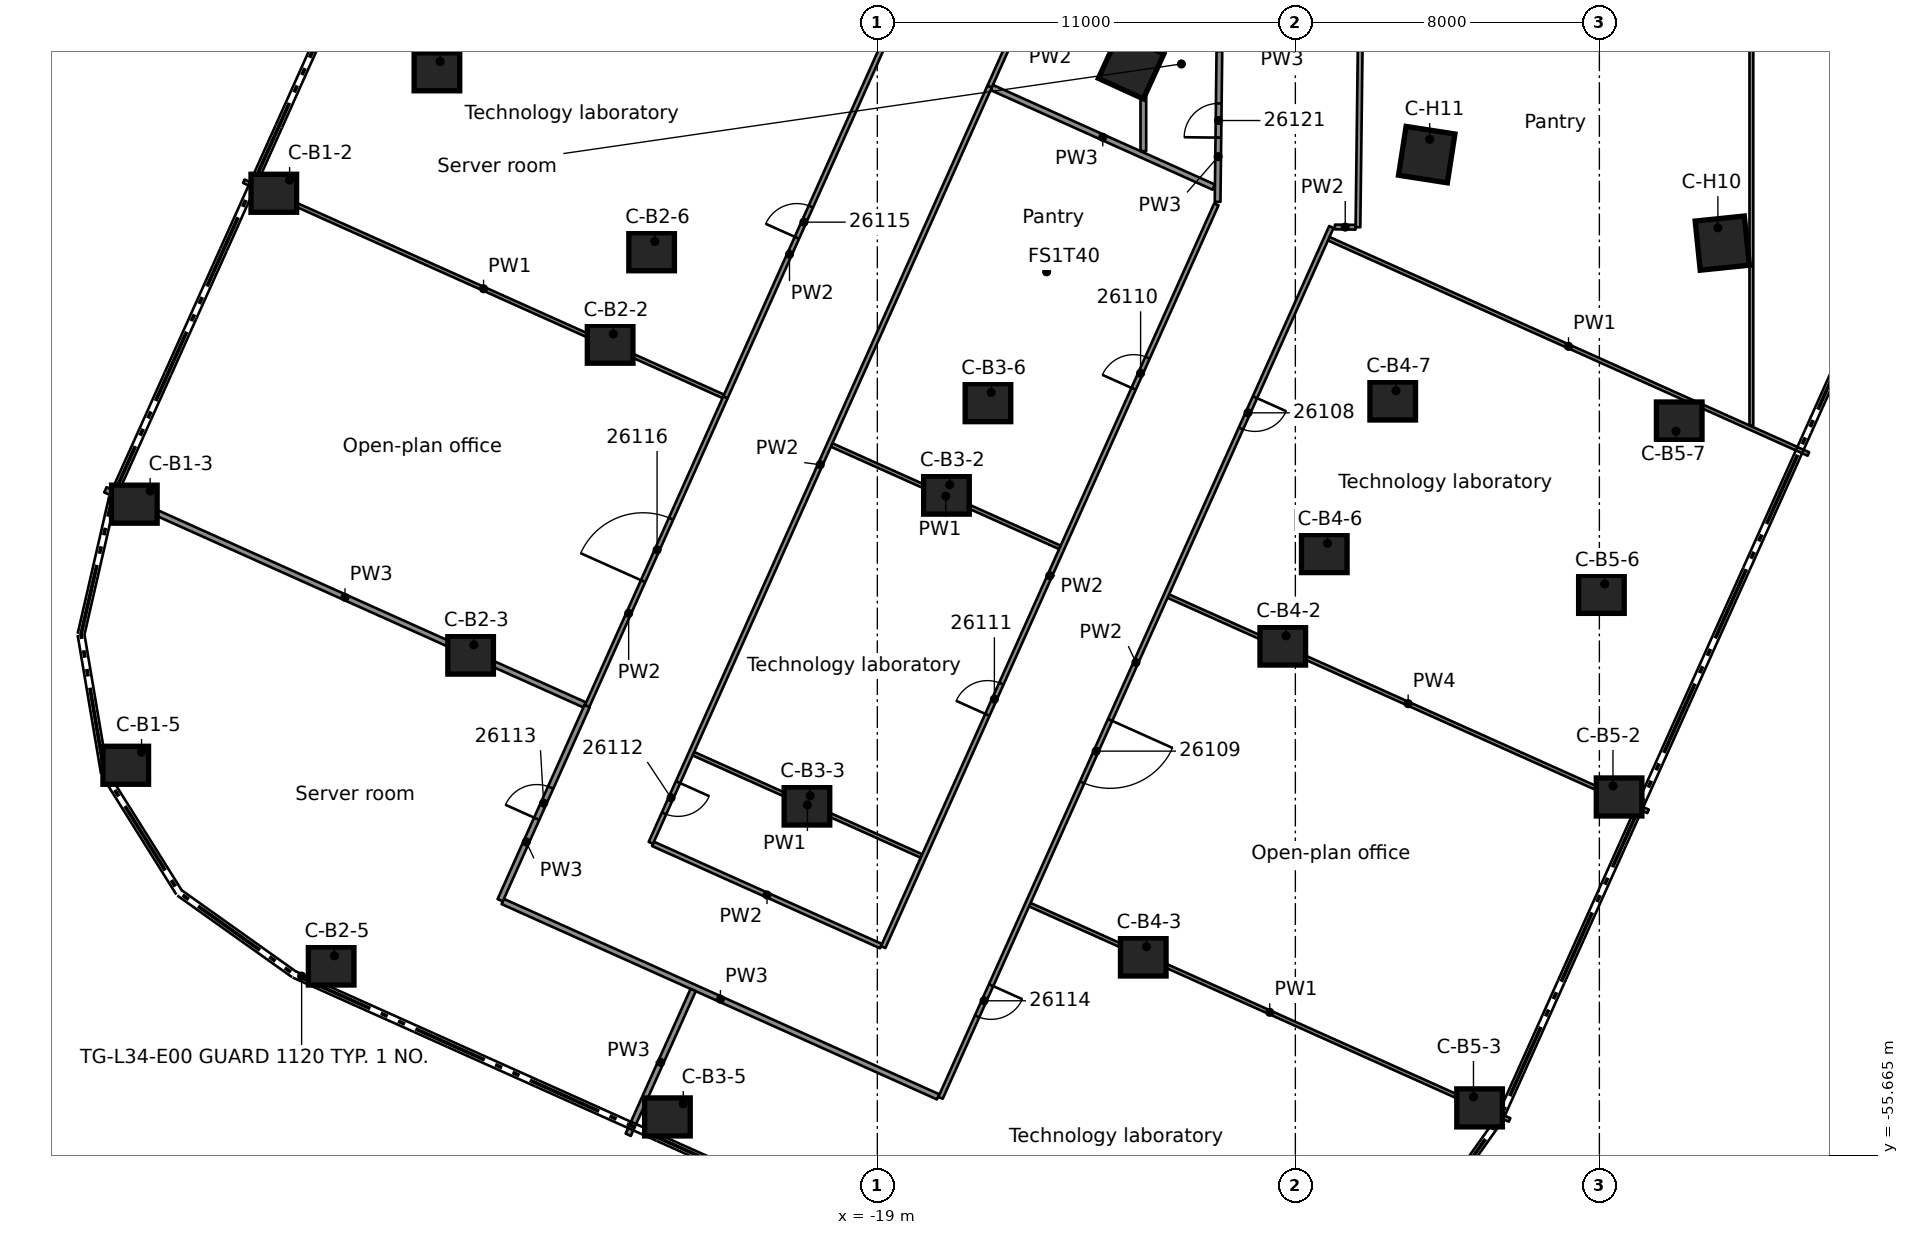
"""IFC4 building model, lengths in metres.
Left out: names, types, materials, properties, quantities, classifications, styles, units other than length and angle.
Written with IfcOpenShell. Run it as: python <this file> out.ifc"""

import sys

from ifc_helpers import new_model, si_unit, direction, frame, frame_2d, origin, origin_2d, place, context, subcontext, project, spatial, rectangle, extrude, element, fill, save


model = new_model("IFC4")
c1 = context("Model", 3, precision=1e-05, world=origin(), true_north=direction((0.0, 1.0)))
c2 = subcontext(c1, "Body", "Model", "MODEL_VIEW")
j1 = project(units=[si_unit("LENGTHUNIT", "METRE"), si_unit("PLANEANGLEUNIT", "RADIAN")], contexts=[c1])
p1 = place(None, origin())
s1 = spatial("IfcSite", under=j1, at=p1, CompositionType="ELEMENT")
p2 = place(p1, origin())
s2 = spatial("IfcBuilding", under=s1, at=p2, CompositionType="ELEMENT")
p3 = place(p2, frame((0.0, 0.0, 134.2)))
s3 = spatial("IfcBuildingStorey", under=s2, at=p3, CompositionType="ELEMENT", Elevation=134.2)
for number, where, z_axis, x_axis in (
    (1, (-34.881, -30.346, 0.0), (0.0, 0.0, 1.0), (1.0, 0.0, 0.0)),
    (2, (-38.551, -38.527, 0.0), (0.0, 0.0, 1.0), (1.0, 0.0, 0.0)),
    (3, (-38.777, -45.397, 0.0), (0.0, 0.0, 1.0), (1.0, 0.0, 0.0)),
    (4, (-30.589, -27.15, 0.0), (0.0, 0.0, 1.0), (1.0, 0.0, 0.0)),
    (5, (-26.031, -34.318, 0.0), (0.0, 0.0, 1.0), (1.0, 0.0, 0.0)),
    (6, (-29.702, -42.498, 0.0), (0.0, 0.0, 1.0), (1.0, 0.0, 0.0)),
    (7, (-33.372, -50.679, 0.0), (0.0, 0.0, 1.0), (1.0, 0.0, 0.0)),
    (8, (-24.939, -31.885, 0.0), (0.0, 0.0, 1.0), (1.0, 0.0, 0.0)),
    (9, (-17.181, -38.289, 0.0), (0.0, 0.0, 1.0), (1.0, 0.0, 0.0)),
    (10, (-20.852, -46.469, 0.0), (0.0, 0.0, 1.0), (1.0, 0.0, 0.0)),
    (11, (-24.523, -54.65, 0.0), (0.0, 0.0, 1.0), (1.0, 0.0, 0.0)),
    (12, (-16.089, -35.856, 0.0), (0.0, 0.0, 1.0), (1.0, 0.0, 0.0)),
    (13, (-8.331, -42.26, 0.0), (0.0, 0.0, 1.0), (1.0, 0.0, 0.0)),
    (14, (-12.002, -50.441, 0.0), (0.0, 0.0, 1.0), (1.0, 0.0, 0.0)),
    (15, (-7.239, -39.827, 0.0), (0.0, 0.0, 1.0), (1.0, 0.0, 0.0)),
    (16, (-5.438, -35.812, 0.0), (0.0, 0.0, 1.0), (1.0, 0.0, 0.0)),
    (17, (0.519, -46.231, 0.0), (0.0, 0.0, 1.0), (1.0, 0.0, 0.0)),
    (18, (-3.152, -54.412, 0.0), (0.0, 0.0, 1.0), (1.0, 0.0, 0.0)),
    (19, (0.054, -40.9, 0.0), (0.0, 0.0, 1.0), (1.0, 0.0, 0.0)),
    (20, (2.101, -36.338, 0.0), (0.0, 0.0, 1.0), (1.0, 0.0, 0.0)),
):
    element("IfcColumn", number, at=place(p3, frame(where, z_axis=z_axis, x_axis=x_axis)), inside=s3, PredefinedType="COLUMN", context=c2, shape_type="SweptSolid", body=[
        extrude(rectangle(XDim=1.2, YDim=1.0, at=origin_2d()), origin(), (0.0, 0.0, 1.0), 3.5),
    ])
for number, where, z_axis, x_axis in (
    (21, (3.234, -31.658, 0.0), (0.0, 0.0, 1.0), (0.102, -0.995, 0.0)),
    (22, (-4.543, -29.329, 0.0), (0.0, 0.0, 1.0), (-0.153, -0.988, 0.0)),
    (23, (-12.321, -27.001, 0.0), (0.0, 0.0, 1.0), (-0.415, -0.91, 0.0)),
):
    element("IfcColumn", number, at=place(p3, frame(where, z_axis=z_axis, x_axis=x_axis)), inside=s3, PredefinedType="COLUMN", context=c2, shape_type="SweptSolid", body=[
        extrude(rectangle(XDim=1.3, YDim=1.3, at=origin_2d()), origin(), (0.0, 0.0, 1.0), 3.5),
    ])
p4 = place(p3, frame((-17.401, -54.121, 0.0), z_axis=(0.0, 0.0, 1.0), x_axis=(-0.912370625887, 0.409365168302, 0.0)))
e24 = element("IfcWall", 24, at=p4, inside=s3, PredefinedType="PARTITIONING", context=c2, shape_type="SweptSolid", body=[
    extrude(rectangle(XDim=12.556, YDim=0.15, at=frame_2d((6.278, 0.0))), origin(), (0.0, 0.0, 1.0), 3.03),
])
p5 = place(p3, frame((-24.903, -47.465, 0.0), z_axis=(0.0, 0.0, 1.0), x_axis=(0.912437629311, -0.409215802013, 0.0)))
e25 = element("IfcWall", 25, at=p5, inside=s3, PredefinedType="PARTITIONING", context=c2, shape_type="SweptSolid", body=[
    extrude(rectangle(XDim=6.576, YDim=0.125, at=frame_2d((3.288, 0.0))), origin(), (0.0, 0.0, 1.0), 3.03),
])
p6 = place(p3, frame((-39.313, -38.149, 0.0), z_axis=(0.0, 0.0, 1.0), x_axis=(0.912370127325, -0.409366279467, 0.0)))
e26 = element("IfcWall", 26, at=p6, inside=s3, PredefinedType="PARTITIONING", context=c2, shape_type="SweptSolid", body=[
    extrude(rectangle(XDim=13.821, YDim=0.15, at=frame_2d((6.911, 0.0))), origin(), (0.0, 0.0, 1.0), 3.03),
])
p7 = place(p3, frame((-23.84, -45.092, 0.0), z_axis=(0.0, 0.0, 1.0), x_axis=(0.912407050909, -0.409283976539, 0.0)))
e27 = element("IfcWall", 27, at=p7, inside=s3, PredefinedType="PARTITIONING", context=c2, shape_type="SweptSolid", body=[
    extrude(rectangle(XDim=6.577, YDim=0.1, at=frame_2d((3.289, 0.0))), origin(), (0.0, 0.0, 1.0), 3.03),
])
p8 = place(p3, frame((-14.987, -49.065, 0.0), z_axis=(0.0, 0.0, 1.0), x_axis=(0.912373916734, -0.409357833763, 0.0)))
e28 = element("IfcWall", 28, at=p8, inside=s3, PredefinedType="PARTITIONING", context=c2, shape_type="SweptSolid", body=[
    extrude(rectangle(XDim=13.836, YDim=0.1, at=frame_2d((6.918, 0.0))), origin(), (0.0, 0.0, 1.0), 3.03),
])
p9 = place(p3, frame((-35.67, -30.029, 0.0), z_axis=(0.0, 0.0, 1.0), x_axis=(0.912388382828, -0.409325590307, 0.0)))
e29 = element("IfcWall", 29, at=p9, inside=s3, PredefinedType="PARTITIONING", context=c2, shape_type="SweptSolid", body=[
    extrude(rectangle(XDim=13.827, YDim=0.1, at=frame_2d((6.914, 0.0))), origin(), (0.0, 0.0, 1.0), 3.03),
])
p10 = place(p3, frame((-20.202, -36.97, 0.0), z_axis=(0.0, 0.0, 1.0), x_axis=(0.912431503612, -0.409229460346, 0.0)))
e30 = element("IfcWall", 30, at=p10, inside=s3, PredefinedType="PARTITIONING", context=c2, shape_type="SweptSolid", body=[
    extrude(rectangle(XDim=6.583, YDim=0.1, at=frame_2d((3.292, 0.0))), origin(), (0.0, 0.0, 1.0), 3.03),
])
p11 = place(p3, frame((-11.344, -40.945, 0.0), z_axis=(0.0, 0.0, 1.0), x_axis=(0.912392332027, -0.409316787413, 0.0)))
e31 = element("IfcWall", 31, at=p11, inside=s3, PredefinedType="PARTITIONING", context=c2, shape_type="SweptSolid", body=[
    extrude(rectangle(XDim=13.837, YDim=0.1, at=frame_2d((6.918, 0.0))), origin(), (0.0, 0.0, 1.0), 2.395),
])
p12 = place(p3, frame((-15.988, -27.564, 0.0), z_axis=(0.0, 0.0, 1.0), x_axis=(0.912384094407, -0.409335149081, 0.0)))
e32 = element("IfcWall", 32, at=p12, inside=s3, PredefinedType="PARTITIONING", context=c2, shape_type="SweptSolid", body=[
    extrude(rectangle(XDim=6.401, YDim=0.15, at=frame_2d((3.2, 0.0))), origin(), (0.0, 0.0, 1.0), 3.03),
])
p13 = place(p3, frame((-7.124, -31.541, 0.0), z_axis=(0.0, 0.0, 1.0), x_axis=(0.91234755526, -0.409416582971, 0.0)))
e33 = element("IfcWall", 33, at=p13, inside=s3, PredefinedType="PARTITIONING", context=c2, shape_type="SweptSolid", body=[
    extrude(rectangle(XDim=13.837, YDim=0.1, at=frame_2d((6.918, 0.0))), origin(), (0.0, 0.0, 1.0), 3.03),
])
p14 = place(p3, frame((-6.959, -31.233, 0.0), z_axis=(0.0, 0.0, 1.0), x_axis=(0.999914995669, -0.013038459926, 0.0)))
e34 = element("IfcWall", 34, at=p14, inside=s3, PredefinedType="PARTITIONING", context=c2, shape_type="SweptSolid", body=[
    extrude(rectangle(XDim=0.543, YDim=0.125, at=frame_2d((0.271, 0.0))), origin(), (0.0, 0.0, 1.0), 3.03),
])
p15 = place(p3, frame((-7.052, -31.233, 0.0), z_axis=(0.0, 0.0, 1.0), x_axis=(-0.409475332718, -0.912321188998, 0.0)))
e35 = element("IfcWall", 35, at=p15, inside=s3, PredefinedType="PARTITIONING", context=c2, shape_type="SweptSolid", body=[
    extrude(rectangle(XDim=25.117, YDim=0.125, at=frame_2d((12.559, 0.0))), origin(), (0.0, 0.0, 1.0), 3.03),
])
p16 = place(p15, frame((4.91, 0.0, 0.0)))
e36 = element("IfcOpeningElement", 36, at=p16, cuts=e35, PredefinedType="OPENING", context=c2, shape_type="SweptSolid", body=[
    extrude(rectangle(XDim=0.9, YDim=2.1, at=frame_2d((0.45, 1.05))), frame((0.0, 0.073, 0.0), z_axis=(0.0, -1.0, 0.0), x_axis=(1.0, 0.0, 0.0)), (0.0, 0.0, 1.0), 0.145),
])
p17 = place(p15, frame((14.217, 0.0, 0.0)))
e37 = element("IfcOpeningElement", 37, at=p17, cuts=e35, PredefinedType="OPENING", context=c2, shape_type="SweptSolid", body=[
    extrude(rectangle(XDim=1.8, YDim=2.1, at=frame_2d((0.9, 1.05))), frame((0.0, 0.073, 0.0), z_axis=(0.0, -1.0, 0.0), x_axis=(1.0, 0.0, 0.0)), (0.0, 0.0, 1.0), 0.145),
])
p18 = place(p15, frame((21.867, 0.0, 0.0)))
e38 = element("IfcOpeningElement", 38, at=p18, cuts=e35, PredefinedType="OPENING", context=c2, shape_type="SweptSolid", body=[
    extrude(rectangle(XDim=0.9, YDim=2.1, at=frame_2d((0.45, 1.05))), frame((0.0, 0.073, 0.0), z_axis=(0.0, -1.0, 0.0), x_axis=(1.0, 0.0, 0.0)), (0.0, 0.0, 1.0), 0.145),
])
p19 = place(p3, frame((-18.846, -50.182, 0.0), z_axis=(0.0, 0.0, 1.0), x_axis=(0.409280065355, 0.912408805363, 0.0)))
e39 = element("IfcWall", 39, at=p19, inside=s3, PredefinedType="PARTITIONING", context=c2, shape_type="SweptSolid", body=[
    extrude(rectangle(XDim=21.42, YDim=0.125, at=frame_2d((10.71, 0.0))), origin(), (0.0, 0.0, 1.0), 3.03),
])
p20 = place(p19, frame((16.1, 0.0, 0.0)))
e40 = element("IfcOpeningElement", 40, at=p20, cuts=e39, PredefinedType="OPENING", context=c2, shape_type="SweptSolid", body=[
    extrude(rectangle(XDim=0.9, YDim=2.1, at=frame_2d((0.45, 1.05))), frame((0.0, 0.073, 0.0), z_axis=(0.0, -1.0, 0.0), x_axis=(1.0, 0.0, 0.0)), (0.0, 0.0, 1.0), 0.145),
])
p21 = place(p19, frame((6.7, 0.0, 0.0)))
e41 = element("IfcOpeningElement", 41, at=p21, cuts=e39, PredefinedType="OPENING", context=c2, shape_type="SweptSolid", body=[
    extrude(rectangle(XDim=0.9, YDim=2.1, at=frame_2d((0.45, 1.05))), frame((0.0, 0.073, 0.0), z_axis=(0.0, -1.0, 0.0), x_axis=(1.0, 0.0, 0.0)), (0.0, 0.0, 1.0), 0.145),
])
p22 = place(p3, frame((-25.555, -55.119, 0.0), z_axis=(0.0, 0.0, 1.0), x_axis=(0.409369884525, 0.912368509783, 0.0)))
e42 = element("IfcWall", 42, at=p22, inside=s3, PredefinedType="PARTITIONING", context=c2, shape_type="SweptSolid", body=[
    extrude(rectangle(XDim=4.175, YDim=0.15, at=frame_2d((2.087, 0.0))), origin(), (0.0, 0.0, 1.0), 3.03),
])
p23 = place(p3, frame((-16.045, -27.538, 0.0), z_axis=(0.0, 0.0, 1.0), x_axis=(-0.408825080593, -0.912612762062, 0.0)))
e43 = element("IfcWall", 43, at=p23, inside=s3, PredefinedType="PARTITIONING", context=c2, shape_type="SweptSolid", body=[
    extrude(rectangle(XDim=21.806, YDim=0.125, at=frame_2d((10.903, 0.0))), origin(), (0.0, 0.0, 1.0), 3.03),
])
p24 = place(p23, frame((20.056, 0.0, 0.0)))
e44 = element("IfcOpeningElement", 44, at=p24, cuts=e43, PredefinedType="OPENING", context=c2, shape_type="SweptSolid", body=[
    extrude(rectangle(XDim=0.9, YDim=2.1, at=frame_2d((0.45, 1.05))), frame((0.0, 0.073, 0.0), z_axis=(0.0, -1.0, 0.0), x_axis=(1.0, 0.0, 0.0)), (0.0, 0.0, 1.0), 0.145),
])
p25 = place(p3, frame((-16.045, -27.538, 0.0), z_axis=(0.0, 0.0, 1.0), x_axis=(0.408690351199, 0.912673105135, 0.0)))
e45 = element("IfcWall", 45, at=p25, inside=s3, PredefinedType="PARTITIONING", context=c2, shape_type="SweptSolid", body=[
    extrude(rectangle(XDim=3.318, YDim=0.125, at=frame_2d((1.659, 0.0))), origin(), (0.0, 0.0, 1.0), 3.03),
])
p26 = place(p3, frame((-28.925, -48.949, 0.0), z_axis=(0.0, 0.0, 1.0), x_axis=(0.408886926623, 0.912585054248, 0.0)))
e46 = element("IfcWall", 46, at=p26, inside=s3, PredefinedType="PARTITIONING", context=c2, shape_type="SweptSolid", body=[
    extrude(rectangle(XDim=5.601, YDim=0.15, at=frame_2d((2.8, 0.0))), origin(), (0.0, 0.0, 1.0), 3.03),
])
p27 = place(p26, frame((2.35, 0.0, 0.0)))
e47 = element("IfcOpeningElement", 47, at=p27, cuts=e46, PredefinedType="OPENING", context=c2, shape_type="SweptSolid", body=[
    extrude(rectangle(XDim=0.9, YDim=2.1, at=frame_2d((0.45, 1.05))), frame((0.0, 0.085, 0.0), z_axis=(0.0, -1.0, 0.0), x_axis=(1.0, 0.0, 0.0)), (0.0, 0.0, 1.0), 0.17),
])
p28 = place(p3, frame((-22.997, -35.715, 0.0), z_axis=(0.0, 0.0, 1.0), x_axis=(0.408864099405, 0.91259528172, 0.0)))
e48 = element("IfcWall", 48, at=p28, inside=s3, PredefinedType="PARTITIONING", context=c2, shape_type="SweptSolid", body=[
    extrude(rectangle(XDim=10.307, YDim=0.125, at=frame_2d((5.153, 0.0))), origin(), (0.0, 0.0, 1.0), 3.03),
])
p29 = place(p28, frame((4.6, 0.0, 0.0)))
e49 = element("IfcOpeningElement", 49, at=p29, cuts=e48, PredefinedType="OPENING", context=c2, shape_type="SweptSolid", body=[
    extrude(rectangle(XDim=0.9, YDim=2.1, at=frame_2d((0.45, 1.05))), frame((0.0, 0.073, 0.0), z_axis=(0.0, -1.0, 0.0), x_axis=(1.0, 0.0, 0.0)), (0.0, 0.0, 1.0), 0.145),
])
p30 = place(p3, frame((-26.635, -43.838, 0.0), z_axis=(0.0, 0.0, 1.0), x_axis=(0.40874555993, 0.912648380943, 0.0)))
e50 = element("IfcWall", 50, at=p30, inside=s3, PredefinedType="PARTITIONING", context=c2, shape_type="SweptSolid", body=[
    extrude(rectangle(XDim=8.9, YDim=0.125, at=frame_2d((4.45, 0.0))), origin(), (0.0, 0.0, 1.0), 3.03),
])
p31 = place(p30, frame((3.6, 0.0, 0.0)))
e51 = element("IfcOpeningElement", 51, at=p31, cuts=e50, PredefinedType="OPENING", context=c2, shape_type="SweptSolid", body=[
    extrude(rectangle(XDim=1.8, YDim=2.1, at=frame_2d((0.9, 1.05))), frame((0.0, 0.073, 0.0), z_axis=(0.0, -1.0, 0.0), x_axis=(1.0, 0.0, 0.0)), (0.0, 0.0, 1.0), 0.145),
])
p32 = place(p3, frame((-6.15, -15.0, 0.0), z_axis=(0.0, 0.0, 1.0), x_axis=(-0.012506726311, -0.99992178784, 0.0)))
e52 = element("IfcWall", 52, at=p32, inside=s3, PredefinedType="PARTITIONING", context=c2, shape_type="SweptSolid", body=[
    extrude(rectangle(XDim=16.241, YDim=0.125, at=frame_2d((8.121, 0.0))), origin(), (0.0, 0.0, 1.0), 3.03),
])
p33 = place(p32, frame((9.227, 0.0, 0.0)))
e53 = element("IfcOpeningElement", 53, at=p33, cuts=e52, PredefinedType="OPENING", context=c2, shape_type="SweptSolid", body=[
    extrude(rectangle(XDim=0.9, YDim=2.1, at=frame_2d((0.45, 1.05))), frame((0.0, 0.073, 0.0), z_axis=(0.0, -1.0, 0.0), x_axis=(1.0, 0.0, 0.0)), (0.0, 0.0, 1.0), 0.145),
])
p34 = place(p3, frame((-10.046, -30.571, 0.0), z_axis=(0.0, 0.0, 1.0), x_axis=(0.011833490909, 0.999929981795, 0.0)))
e54 = element("IfcWall", 54, at=p34, inside=s3, PredefinedType="PARTITIONING", context=c2, shape_type="SweptSolid", body=[
    extrude(rectangle(XDim=3.961, YDim=0.15, at=frame_2d((1.98, 0.0))), origin(), (0.0, 0.0, 1.0), 3.03),
])
p35 = place(p34, frame((1.689, 0.0, 0.0)))
e55 = element("IfcOpeningElement", 55, at=p35, cuts=e54, PredefinedType="OPENING", context=c2, shape_type="SweptSolid", body=[
    extrude(rectangle(XDim=0.9, YDim=2.1, at=frame_2d((0.45, 1.05))), frame((0.0, 0.085, 0.0), z_axis=(0.0, -1.0, 0.0), x_axis=(1.0, 0.0, 0.0)), (0.0, 0.0, 1.0), 0.17),
])
p36 = place(p3, frame((4.0, -36.456, 0.0), z_axis=(0.0, 0.0, 1.0), x_axis=(0.0, 1.0, 0.0)))
e56 = element("IfcWall", 56, at=p36, inside=s3, PredefinedType="PARTITIONING", context=c2, shape_type="SweptSolid", body=[
    extrude(rectangle(XDim=21.393, YDim=0.1, at=frame_2d((10.697, 0.0))), origin(), (0.0, 0.0, 1.0), 2.395),
])
p37 = place(p3, frame((-12.0, -29.237, 0.0), z_axis=(0.0, 0.0, 1.0), x_axis=(0.0, 1.0, 0.0)))
e57 = element("IfcWall", 57, at=p37, inside=s3, PredefinedType="PARTITIONING", context=c2, shape_type="SweptSolid", body=[
    extrude(rectangle(XDim=14.111, YDim=0.15, at=frame_2d((7.056, 0.0))), origin(), (0.0, 0.0, 1.0), 3.03),
])
p38 = place(p16, origin())
e58 = element("IfcDoor", 58, at=p38, inside=s3, OperationType="SINGLE_SWING_LEFT", PredefinedType="DOOR", context=c2, shape_type="SweptSolid", body=[
    extrude(rectangle(XDim=0.9, YDim=2.1, at=frame_2d((0.45, 1.05))), frame((0.0, 0.025, 0.0), z_axis=(0.0, -1.0, 0.0), x_axis=(1.0, 0.0, 0.0)), (0.0, 0.0, 1.0), 0.05),
])
fill(e36, e58)
p39 = place(p17, origin())
e59 = element("IfcDoor", 59, at=p39, inside=s3, OperationType="DOUBLE_DOOR_SINGLE_SWING", PredefinedType="DOOR", context=c2, shape_type="SweptSolid", body=[
    extrude(rectangle(XDim=1.8, YDim=2.1, at=frame_2d((0.9, 1.05))), frame((0.0, 0.025, 0.0), z_axis=(0.0, -1.0, 0.0), x_axis=(1.0, 0.0, 0.0)), (0.0, 0.0, 1.0), 0.05),
])
fill(e37, e59)
p40 = place(p20, origin())
e60 = element("IfcDoor", 60, at=p40, inside=s3, OperationType="SINGLE_SWING_RIGHT", PredefinedType="DOOR", context=c2, shape_type="SweptSolid", body=[
    extrude(rectangle(XDim=0.9, YDim=2.1, at=frame_2d((0.45, 1.05))), frame((0.0, 0.025, 0.0), z_axis=(0.0, -1.0, 0.0), x_axis=(1.0, 0.0, 0.0)), (0.0, 0.0, 1.0), 0.05),
])
fill(e40, e60)
p41 = place(p21, origin())
e61 = element("IfcDoor", 61, at=p41, inside=s3, OperationType="SINGLE_SWING_LEFT", PredefinedType="DOOR", context=c2, shape_type="SweptSolid", body=[
    extrude(rectangle(XDim=0.9, YDim=2.1, at=frame_2d((0.45, 1.05))), frame((0.0, 0.025, 0.0), z_axis=(0.0, -1.0, 0.0), x_axis=(1.0, 0.0, 0.0)), (0.0, 0.0, 1.0), 0.05),
])
fill(e41, e61)
p42 = place(p24, origin())
e62 = element("IfcDoor", 62, at=p42, inside=s3, OperationType="SINGLE_SWING_RIGHT", PredefinedType="DOOR", context=c2, shape_type="SweptSolid", body=[
    extrude(rectangle(XDim=0.9, YDim=2.1, at=frame_2d((0.45, 1.05))), frame((0.0, 0.025, 0.0), z_axis=(0.0, -1.0, 0.0), x_axis=(1.0, 0.0, 0.0)), (0.0, 0.0, 1.0), 0.05),
])
fill(e44, e62)
p43 = place(p27, origin())
e63 = element("IfcDoor", 63, at=p43, inside=s3, OperationType="SINGLE_SWING_LEFT", PredefinedType="DOOR", context=c2, shape_type="SweptSolid", body=[
    extrude(rectangle(XDim=0.9, YDim=2.1, at=frame_2d((0.45, 1.05))), frame((0.0, 0.025, 0.0), z_axis=(0.0, -1.0, 0.0), x_axis=(1.0, 0.0, 0.0)), (0.0, 0.0, 1.0), 0.05),
])
fill(e47, e63)
p44 = place(p18, origin())
e64 = element("IfcDoor", 64, at=p44, inside=s3, OperationType="SINGLE_SWING_RIGHT", PredefinedType="DOOR", context=c2, shape_type="SweptSolid", body=[
    extrude(rectangle(XDim=0.9, YDim=2.1, at=frame_2d((0.45, 1.05))), frame((0.0, 0.025, 0.0), z_axis=(0.0, -1.0, 0.0), x_axis=(1.0, 0.0, 0.0)), (0.0, 0.0, 1.0), 0.05),
])
fill(e38, e64)
p45 = place(p29, origin())
e65 = element("IfcDoor", 65, at=p45, inside=s3, OperationType="SINGLE_SWING_LEFT", PredefinedType="DOOR", context=c2, shape_type="SweptSolid", body=[
    extrude(rectangle(XDim=0.9, YDim=2.1, at=frame_2d((0.45, 1.05))), frame((0.0, 0.025, 0.0), z_axis=(0.0, -1.0, 0.0), x_axis=(1.0, 0.0, 0.0)), (0.0, 0.0, 1.0), 0.05),
])
fill(e49, e65)
p46 = place(p31, origin())
e66 = element("IfcDoor", 66, at=p46, inside=s3, OperationType="DOUBLE_DOOR_SINGLE_SWING", PredefinedType="DOOR", context=c2, shape_type="SweptSolid", body=[
    extrude(rectangle(XDim=1.8, YDim=2.1, at=frame_2d((0.9, 1.05))), frame((0.0, 0.025, 0.0), z_axis=(0.0, -1.0, 0.0), x_axis=(1.0, 0.0, 0.0)), (0.0, 0.0, 1.0), 0.05),
])
fill(e51, e66)
p47 = place(p35, origin())
e67 = element("IfcDoor", 67, at=p47, inside=s3, OperationType="SINGLE_SWING_RIGHT", PredefinedType="DOOR", context=c2, shape_type="SweptSolid", body=[
    extrude(rectangle(XDim=0.9, YDim=2.1, at=frame_2d((0.45, 1.05))), frame((0.0, 0.025, 0.0), z_axis=(0.0, -1.0, 0.0), x_axis=(1.0, 0.0, 0.0)), (0.0, 0.0, 1.0), 0.05),
])
fill(e55, e67)
save(model, sys.argv[1])
